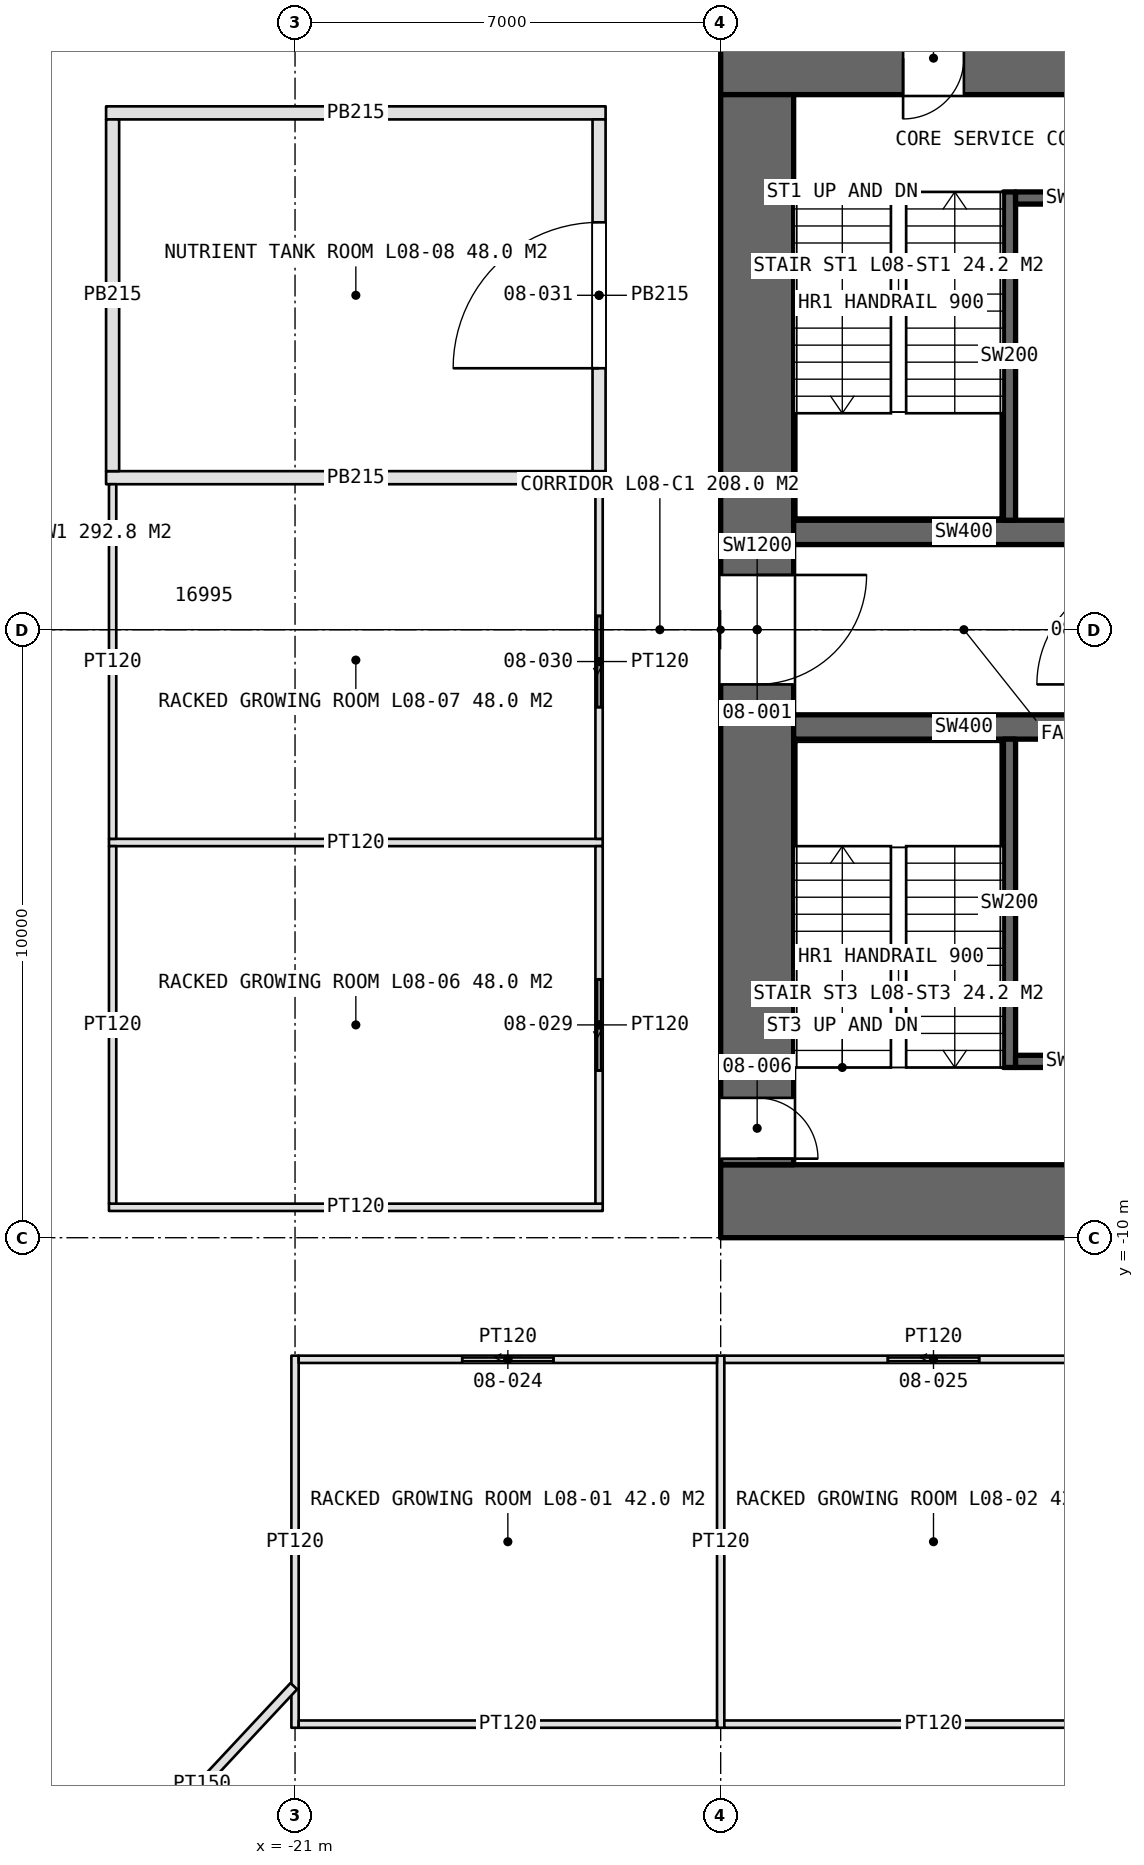
"""IFC4 building model, lengths in metres.
Left out: names, types, materials, properties, quantities, classifications, styles, units other than length and angle.
Written with IfcOpenShell. Run it as: python <this file> out.ifc"""

import sys

from ifc_helpers import new_model, si_unit, direction, frame, frame_2d, origin, place, context, subcontext, project, spatial, rectangle, extrude, element, fill, save


model = new_model("IFC4")
c1 = context("Model", 3, precision=1e-05, world=origin(), true_north=direction((0.0, 1.0)))
c2 = subcontext(c1, "Body", "Model", "MODEL_VIEW")
j1 = project(units=[si_unit("LENGTHUNIT", "METRE"), si_unit("PLANEANGLEUNIT", "RADIAN")], contexts=[c1])
p1 = place(None, origin())
s1 = spatial("IfcSite", under=j1, at=p1, CompositionType="ELEMENT")
p2 = place(p1, origin())
s2 = spatial("IfcBuilding", under=s1, at=p2, CompositionType="ELEMENT")
p3 = place(p2, frame((0.0, 0.0, 40.0)))
s3 = spatial("IfcBuildingStorey", under=s2, at=p3, CompositionType="ELEMENT", Elevation=40.0)
p4 = place(p3, frame((-14.0, -9.4, 0.0), z_axis=(0.0, 0.0, 1.0), x_axis=(1.0, 0.0, 0.0)))
e1 = element("IfcWall", 1, at=p4, inside=s3, PredefinedType="SHEAR", context=c2, shape_type="SweptSolid", body=[
    extrude(rectangle(XDim=28.0, YDim=1.2, at=frame_2d((14.0, 0.0))), origin(), (0.0, 0.0, 1.0), 5.0),
])
p5 = place(p4, frame((13.1, 0.0, 0.0)))
e2 = element("IfcOpeningElement", 2, at=p5, cuts=e1, PredefinedType="OPENING", context=c2, shape_type="SweptSolid", body=[
    extrude(rectangle(XDim=1.8, YDim=2.4, at=frame_2d((0.9, 1.2))), frame((0.0, 0.61, 0.0), z_axis=(0.0, -1.0, 0.0), x_axis=(1.0, 0.0, 0.0)), (0.0, 0.0, 1.0), 1.22),
])
p6 = place(p4, frame((22.9, 0.0, 0.0)))
e3 = element("IfcOpeningElement", 3, at=p6, cuts=e1, PredefinedType="OPENING", context=c2, shape_type="SweptSolid", body=[
    extrude(rectangle(XDim=2.2, YDim=2.7, at=frame_2d((1.1, 1.35))), frame((0.0, 0.61, 0.0), z_axis=(0.0, -1.0, 0.0), x_axis=(1.0, 0.0, 0.0)), (0.0, 0.0, 1.0), 1.22),
])
p7 = place(p3, frame((14.0, 9.4, 0.0), z_axis=(0.0, 0.0, 1.0), x_axis=(-1.0, 0.0, 0.0)))
e4 = element("IfcWall", 4, at=p7, inside=s3, PredefinedType="SHEAR", context=c2, shape_type="SweptSolid", body=[
    extrude(rectangle(XDim=28.0, YDim=1.2, at=frame_2d((14.0, 0.0))), origin(), (0.0, 0.0, 1.0), 5.0),
])
p8 = place(p7, frame((24.0, 0.0, 0.0)))
e5 = element("IfcOpeningElement", 5, at=p8, cuts=e4, PredefinedType="OPENING", context=c2, shape_type="SweptSolid", body=[
    extrude(rectangle(XDim=1.0, YDim=2.4, at=frame_2d((0.5, 1.2))), frame((0.0, 0.61, 0.0), z_axis=(0.0, -1.0, 0.0), x_axis=(1.0, 0.0, 0.0)), (0.0, 0.0, 1.0), 1.22),
])
p9 = place(p7, frame((13.1, 0.0, 0.0)))
e6 = element("IfcOpeningElement", 6, at=p9, cuts=e4, PredefinedType="OPENING", context=c2, shape_type="SweptSolid", body=[
    extrude(rectangle(XDim=1.8, YDim=2.4, at=frame_2d((0.9, 1.2))), frame((0.0, 0.61, 0.0), z_axis=(0.0, -1.0, 0.0), x_axis=(1.0, 0.0, 0.0)), (0.0, 0.0, 1.0), 1.22),
])
p10 = place(p3, frame((-13.4, 8.8, 0.0), z_axis=(0.0, 0.0, 1.0), x_axis=(0.0, -1.0, 0.0)))
e7 = element("IfcWall", 7, at=p10, inside=s3, PredefinedType="SHEAR", context=c2, shape_type="SweptSolid", body=[
    extrude(rectangle(XDim=17.6, YDim=1.2, at=frame_2d((8.8, 0.0))), origin(), (0.0, 0.0, 1.0), 5.0),
])
p11 = place(p10, frame((7.9, 0.0, 0.0)))
e8 = element("IfcOpeningElement", 8, at=p11, cuts=e7, PredefinedType="OPENING", context=c2, shape_type="SweptSolid", body=[
    extrude(rectangle(XDim=1.8, YDim=2.4, at=frame_2d((0.9, 1.2))), frame((0.0, 0.61, 0.0), z_axis=(0.0, -1.0, 0.0), x_axis=(1.0, 0.0, 0.0)), (0.0, 0.0, 1.0), 1.22),
])
p12 = place(p10, frame((16.5, 0.0, 0.0)))
e9 = element("IfcOpeningElement", 9, at=p12, cuts=e7, PredefinedType="OPENING", context=c2, shape_type="SweptSolid", body=[
    extrude(rectangle(XDim=1.0, YDim=2.4, at=frame_2d((0.5, 1.2))), frame((0.0, 0.61, 0.0), z_axis=(0.0, -1.0, 0.0), x_axis=(1.0, 0.0, 0.0)), (0.0, 0.0, 1.0), 1.22),
])
for number, where, z_axis, x_axis in (
    (10, (-12.8, 1.6, 0.0), (0.0, 0.0, 1.0), (1.0, 0.0, 0.0)),
    (11, (-12.8, -1.6, 0.0), (0.0, 0.0, 1.0), (1.0, 0.0, 0.0)),
):
    element("IfcWall", number, at=place(p3, frame(where, z_axis=z_axis, x_axis=x_axis)), inside=s3, PredefinedType="SHEAR", context=c2, shape_type="SweptSolid", body=[
        extrude(rectangle(XDim=5.6, YDim=0.4, at=frame_2d((2.8, 0.0))), origin(), (0.0, 0.0, 1.0), 5.0),
    ])
p13 = place(p3, frame((-9.25, 7.2, 0.0), z_axis=(0.0, 0.0, 1.0), x_axis=(0.0, -1.0, 0.0)))
e12 = element("IfcWall", 12, at=p13, inside=s3, PredefinedType="SOLIDWALL", context=c2, shape_type="SweptSolid", body=[
    extrude(rectangle(XDim=5.4, YDim=0.2, at=frame_2d((2.7, 0.0))), origin(), (0.0, 0.0, 1.0), 5.0),
])
p14 = place(p3, frame((-9.15, 7.1, 0.0), z_axis=(0.0, 0.0, 1.0), x_axis=(1.0, 0.0, 0.0)))
e13 = element("IfcWall", 13, at=p14, inside=s3, PredefinedType="SOLIDWALL", context=c2, shape_type="SweptSolid", body=[
    extrude(rectangle(XDim=1.95, YDim=0.2, at=frame_2d((0.975, 0.0))), origin(), (0.0, 0.0, 1.0), 5.0),
])
p15 = place(p3, frame((-9.25, -7.2, 0.0), z_axis=(0.0, 0.0, 1.0), x_axis=(0.0, 1.0, 0.0)))
e14 = element("IfcWall", 14, at=p15, inside=s3, PredefinedType="SOLIDWALL", context=c2, shape_type="SweptSolid", body=[
    extrude(rectangle(XDim=5.4, YDim=0.2, at=frame_2d((2.7, 0.0))), origin(), (0.0, 0.0, 1.0), 5.0),
])
p16 = place(p3, frame((-9.15, -7.1, 0.0), z_axis=(0.0, 0.0, 1.0), x_axis=(1.0, 0.0, 0.0)))
e15 = element("IfcWall", 15, at=p16, inside=s3, PredefinedType="SOLIDWALL", context=c2, shape_type="SweptSolid", body=[
    extrude(rectangle(XDim=1.95, YDim=0.2, at=frame_2d((0.975, 0.0))), origin(), (0.0, 0.0, 1.0), 5.0),
])
for number, where, z_axis, x_axis in (
    (16, (-21.0, -11.94, 0.0), (0.0, 0.0, 1.0), (0.0, -1.0, 0.0)),
    (17, (-14.0, -11.94, 0.0), (0.0, 0.0, 1.0), (0.0, -1.0, 0.0)),
):
    element("IfcWall", number, at=place(p3, frame(where, z_axis=z_axis, x_axis=x_axis)), inside=s3, PredefinedType="PARTITIONING", context=c2, shape_type="SweptSolid", body=[
        extrude(rectangle(XDim=6.12, YDim=0.12, at=frame_2d((3.06, 0.0))), origin(), (0.0, 0.0, 1.0), 3.6),
    ])
p17 = place(p3, frame((-20.94, -12.0, 0.0), z_axis=(0.0, 0.0, 1.0), x_axis=(1.0, 0.0, 0.0)))
e18 = element("IfcWall", 18, at=p17, inside=s3, PredefinedType="PARTITIONING", context=c2, shape_type="SweptSolid", body=[
    extrude(rectangle(XDim=6.88, YDim=0.12, at=frame_2d((3.44, 0.0))), origin(), (0.0, 0.0, 1.0), 3.6),
])
p18 = place(p17, frame((2.69, 0.0, 0.0)))
e19 = element("IfcOpeningElement", 19, at=p18, cuts=e18, PredefinedType="OPENING", context=c2, shape_type="SweptSolid", body=[
    extrude(rectangle(XDim=1.5, YDim=2.5, at=frame_2d((0.75, 1.25))), frame((0.0, 0.07, 0.0), z_axis=(0.0, -1.0, 0.0), x_axis=(1.0, 0.0, 0.0)), (0.0, 0.0, 1.0), 0.14),
])
p19 = place(p3, frame((-20.94, -18.0, 0.0), z_axis=(0.0, 0.0, 1.0), x_axis=(1.0, 0.0, 0.0)))
e20 = element("IfcWall", 20, at=p19, inside=s3, PredefinedType="PARTITIONING", context=c2, shape_type="SweptSolid", body=[
    extrude(rectangle(XDim=6.88, YDim=0.12, at=frame_2d((3.44, 0.0))), origin(), (0.0, 0.0, 1.0), 3.6),
])
p20 = place(p3, frame((-13.94, -12.0, 0.0), z_axis=(0.0, 0.0, 1.0), x_axis=(1.0, 0.0, 0.0)))
e21 = element("IfcWall", 21, at=p20, inside=s3, PredefinedType="PARTITIONING", context=c2, shape_type="SweptSolid", body=[
    extrude(rectangle(XDim=6.88, YDim=0.12, at=frame_2d((3.44, 0.0))), origin(), (0.0, 0.0, 1.0), 3.6),
])
p21 = place(p20, frame((2.69, 0.0, 0.0)))
e22 = element("IfcOpeningElement", 22, at=p21, cuts=e21, PredefinedType="OPENING", context=c2, shape_type="SweptSolid", body=[
    extrude(rectangle(XDim=1.5, YDim=2.5, at=frame_2d((0.75, 1.25))), frame((0.0, 0.07, 0.0), z_axis=(0.0, -1.0, 0.0), x_axis=(1.0, 0.0, 0.0)), (0.0, 0.0, 1.0), 0.14),
])
p22 = place(p3, frame((-13.94, -18.0, 0.0), z_axis=(0.0, 0.0, 1.0), x_axis=(1.0, 0.0, 0.0)))
e23 = element("IfcWall", 23, at=p22, inside=s3, PredefinedType="PARTITIONING", context=c2, shape_type="SweptSolid", body=[
    extrude(rectangle(XDim=6.88, YDim=0.12, at=frame_2d((3.44, 0.0))), origin(), (0.0, 0.0, 1.0), 3.6),
])
for number, where, z_axis, x_axis in (
    (24, (-15.94, -9.5, 0.0), (0.0, 0.0, 1.0), (-1.0, 0.0, 0.0)),
    (25, (-15.94, -3.5, 0.0), (0.0, 0.0, 1.0), (-1.0, 0.0, 0.0)),
):
    element("IfcWall", number, at=place(p3, frame(where, z_axis=z_axis, x_axis=x_axis)), inside=s3, PredefinedType="PARTITIONING", context=c2, shape_type="SweptSolid", body=[
        extrude(rectangle(XDim=8.12, YDim=0.12, at=frame_2d((4.06, 0.0))), origin(), (0.0, 0.0, 1.0), 3.6),
    ])
for number, where, z_axis, x_axis in (
    (26, (-15.893, 2.5, 0.0), (0.0, 0.0, 1.0), (-1.0, 0.0, 0.0)),
    (27, (-15.893, 8.5, 0.0), (0.0, 0.0, 1.0), (-1.0, 0.0, 0.0)),
):
    element("IfcWall", number, at=place(p3, frame(where, z_axis=z_axis, x_axis=x_axis)), inside=s3, PredefinedType="PARTITIONING", context=c2, shape_type="SweptSolid", body=[
        extrude(rectangle(XDim=8.215, YDim=0.215, at=frame_2d((4.107, 0.0))), origin(), (0.0, 0.0, 1.0), 3.6),
    ])
p23 = place(p3, frame((-16.0, -9.44, 0.0), z_axis=(0.0, 0.0, 1.0), x_axis=(0.0, 1.0, 0.0)))
e28 = element("IfcWall", 28, at=p23, inside=s3, PredefinedType="PARTITIONING", context=c2, shape_type="SweptSolid", body=[
    extrude(rectangle(XDim=5.88, YDim=0.12, at=frame_2d((2.94, 0.0))), origin(), (0.0, 0.0, 1.0), 3.6),
])
p24 = place(p23, frame((2.19, 0.0, 0.0)))
e29 = element("IfcOpeningElement", 29, at=p24, cuts=e28, PredefinedType="OPENING", context=c2, shape_type="SweptSolid", body=[
    extrude(rectangle(XDim=1.5, YDim=2.5, at=frame_2d((0.75, 1.25))), frame((0.0, 0.07, 0.0), z_axis=(0.0, -1.0, 0.0), x_axis=(1.0, 0.0, 0.0)), (0.0, 0.0, 1.0), 0.14),
])
p25 = place(p3, frame((-24.0, -9.44, 0.0), z_axis=(0.0, 0.0, 1.0), x_axis=(0.0, 1.0, 0.0)))
e30 = element("IfcWall", 30, at=p25, inside=s3, PredefinedType="PARTITIONING", context=c2, shape_type="SweptSolid", body=[
    extrude(rectangle(XDim=5.88, YDim=0.12, at=frame_2d((2.94, 0.0))), origin(), (0.0, 0.0, 1.0), 3.6),
])
p26 = place(p3, frame((-16.0, -3.44, 0.0), z_axis=(0.0, 0.0, 1.0), x_axis=(0.0, 1.0, 0.0)))
e31 = element("IfcWall", 31, at=p26, inside=s3, PredefinedType="PARTITIONING", context=c2, shape_type="SweptSolid", body=[
    extrude(rectangle(XDim=5.833, YDim=0.12, at=frame_2d((2.916, 0.0))), origin(), (0.0, 0.0, 1.0), 3.6),
])
p27 = place(p26, frame((2.166, 0.0, 0.0)))
e32 = element("IfcOpeningElement", 32, at=p27, cuts=e31, PredefinedType="OPENING", context=c2, shape_type="SweptSolid", body=[
    extrude(rectangle(XDim=1.5, YDim=2.5, at=frame_2d((0.75, 1.25))), frame((0.0, 0.07, 0.0), z_axis=(0.0, -1.0, 0.0), x_axis=(1.0, 0.0, 0.0)), (0.0, 0.0, 1.0), 0.14),
])
p28 = place(p3, frame((-24.0, -3.44, 0.0), z_axis=(0.0, 0.0, 1.0), x_axis=(0.0, 1.0, 0.0)))
e33 = element("IfcWall", 33, at=p28, inside=s3, PredefinedType="PARTITIONING", context=c2, shape_type="SweptSolid", body=[
    extrude(rectangle(XDim=5.833, YDim=0.12, at=frame_2d((2.916, 0.0))), origin(), (0.0, 0.0, 1.0), 3.6),
])
p29 = place(p3, frame((-16.0, 2.607, 0.0), z_axis=(0.0, 0.0, 1.0), x_axis=(0.0, 1.0, 0.0)))
e34 = element("IfcWall", 34, at=p29, inside=s3, PredefinedType="PARTITIONING", context=c2, shape_type="SweptSolid", body=[
    extrude(rectangle(XDim=5.785, YDim=0.215, at=frame_2d((2.893, 0.0))), origin(), (0.0, 0.0, 1.0), 3.6),
])
p30 = place(p29, frame((1.692, 0.0, 0.0)))
e35 = element("IfcOpeningElement", 35, at=p30, cuts=e34, PredefinedType="OPENING", context=c2, shape_type="SweptSolid", body=[
    extrude(rectangle(XDim=2.4, YDim=2.4, at=frame_2d((1.2, 1.2))), frame((0.0, 0.118, 0.0), z_axis=(0.0, -1.0, 0.0), x_axis=(1.0, 0.0, 0.0)), (0.0, 0.0, 1.0), 0.235),
])
p31 = place(p3, frame((-24.0, 2.607, 0.0), z_axis=(0.0, 0.0, 1.0), x_axis=(0.0, 1.0, 0.0)))
e36 = element("IfcWall", 36, at=p31, inside=s3, PredefinedType="PARTITIONING", context=c2, shape_type="SweptSolid", body=[
    extrude(rectangle(XDim=5.785, YDim=0.215, at=frame_2d((2.893, 0.0))), origin(), (0.0, 0.0, 1.0), 3.6),
])
p32 = place(p3, frame((-21.02, -17.375, 0.0), z_axis=(0.0, 0.0, 1.0), x_axis=(-0.682511222631, -0.730875113123, 0.0)))
e37 = element("IfcWall", 37, at=p32, inside=s3, PredefinedType="PARTITIONING", context=c2, shape_type="SweptSolid", body=[
    extrude(rectangle(XDim=4.417, YDim=0.15, at=frame_2d((2.208, 0.0))), origin(), (0.0, 0.0, 1.0), 3.6),
])
p33 = place(p11, origin())
e38 = element("IfcDoor", 38, at=p33, inside=s3, OperationType="DOUBLE_DOOR_SINGLE_SWING", PredefinedType="DOOR", context=c2, shape_type="SweptSolid", body=[
    extrude(rectangle(XDim=1.8, YDim=2.4, at=frame_2d((0.9, 1.2))), frame((0.0, 0.025, 0.0), z_axis=(0.0, -1.0, 0.0), x_axis=(1.0, 0.0, 0.0)), (0.0, 0.0, 1.0), 0.05),
])
fill(e8, e38)
p34 = place(p8, origin())
e39 = element("IfcDoor", 39, at=p34, inside=s3, OperationType="SINGLE_SWING_RIGHT", PredefinedType="DOOR", context=c2, shape_type="SweptSolid", body=[
    extrude(rectangle(XDim=1.0, YDim=2.4, at=frame_2d((0.5, 1.2))), frame((0.0, 0.025, 0.0), z_axis=(0.0, -1.0, 0.0), x_axis=(1.0, 0.0, 0.0)), (0.0, 0.0, 1.0), 0.05),
])
fill(e5, e39)
p35 = place(p12, origin())
e40 = element("IfcDoor", 40, at=p35, inside=s3, OperationType="SINGLE_SWING_RIGHT", PredefinedType="DOOR", context=c2, shape_type="SweptSolid", body=[
    extrude(rectangle(XDim=1.0, YDim=2.4, at=frame_2d((0.5, 1.2))), frame((0.0, 0.025, 0.0), z_axis=(0.0, -1.0, 0.0), x_axis=(1.0, 0.0, 0.0)), (0.0, 0.0, 1.0), 0.05),
])
fill(e9, e40)
p36 = place(p18, origin())
e41 = element("IfcDoor", 41, at=p36, inside=s3, OperationType="SLIDING_TO_LEFT", PredefinedType="DOOR", context=c2, shape_type="SweptSolid", body=[
    extrude(rectangle(XDim=1.5, YDim=2.5, at=frame_2d((0.75, 1.25))), frame((0.0, 0.025, 0.0), z_axis=(0.0, -1.0, 0.0), x_axis=(1.0, 0.0, 0.0)), (0.0, 0.0, 1.0), 0.05),
])
fill(e19, e41)
p37 = place(p21, origin())
e42 = element("IfcDoor", 42, at=p37, inside=s3, OperationType="SLIDING_TO_LEFT", PredefinedType="DOOR", context=c2, shape_type="SweptSolid", body=[
    extrude(rectangle(XDim=1.5, YDim=2.5, at=frame_2d((0.75, 1.25))), frame((0.0, 0.025, 0.0), z_axis=(0.0, -1.0, 0.0), x_axis=(1.0, 0.0, 0.0)), (0.0, 0.0, 1.0), 0.05),
])
fill(e22, e42)
p38 = place(p24, origin())
e43 = element("IfcDoor", 43, at=p38, inside=s3, OperationType="SLIDING_TO_LEFT", PredefinedType="DOOR", context=c2, shape_type="SweptSolid", body=[
    extrude(rectangle(XDim=1.5, YDim=2.5, at=frame_2d((0.75, 1.25))), frame((0.0, 0.025, 0.0), z_axis=(0.0, -1.0, 0.0), x_axis=(1.0, 0.0, 0.0)), (0.0, 0.0, 1.0), 0.05),
])
fill(e29, e43)
p39 = place(p27, origin())
e44 = element("IfcDoor", 44, at=p39, inside=s3, OperationType="SLIDING_TO_LEFT", PredefinedType="DOOR", context=c2, shape_type="SweptSolid", body=[
    extrude(rectangle(XDim=1.5, YDim=2.5, at=frame_2d((0.75, 1.25))), frame((0.0, 0.025, 0.0), z_axis=(0.0, -1.0, 0.0), x_axis=(1.0, 0.0, 0.0)), (0.0, 0.0, 1.0), 0.05),
])
fill(e32, e44)
p40 = place(p30, origin())
e45 = element("IfcDoor", 45, at=p40, inside=s3, OperationType="DOUBLE_DOOR_SINGLE_SWING", PredefinedType="DOOR", context=c2, shape_type="SweptSolid", body=[
    extrude(rectangle(XDim=2.4, YDim=2.4, at=frame_2d((1.2, 1.2))), frame((0.0, 0.025, 0.0), z_axis=(0.0, -1.0, 0.0), x_axis=(1.0, 0.0, 0.0)), (0.0, 0.0, 1.0), 0.05),
])
fill(e35, e45)
save(model, sys.argv[1])
